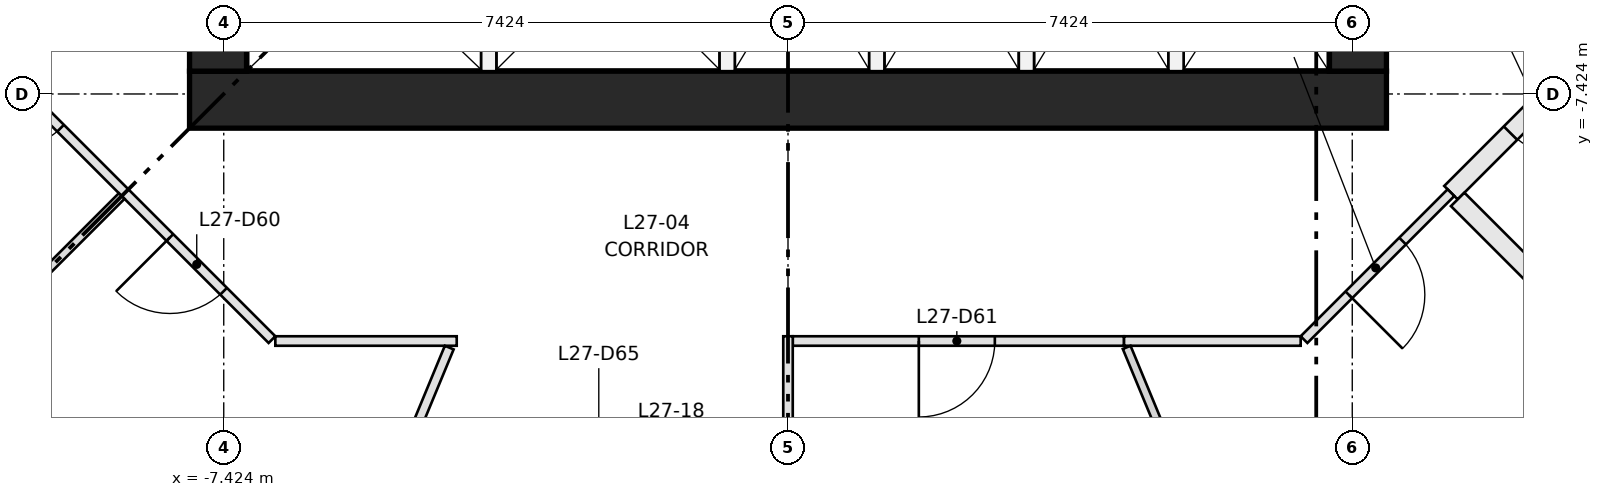
"""IFC4 building model, lengths in metres.
Left out: names, types, materials, properties, quantities, classifications, styles, units other than length and angle.
Written with IfcOpenShell. Run it as: python <this file> out.ifc"""

import sys

from ifc_helpers import new_model, si_unit, direction, frame, frame_2d, origin, place, context, subcontext, project, spatial, rectangle, extrude, element, fill, save


model = new_model("IFC4")
c1 = context("Model", 3, precision=1e-05, world=origin(), true_north=direction((0.0, 1.0)))
c2 = subcontext(c1, "Body", "Model", "MODEL_VIEW")
j1 = project(units=[si_unit("LENGTHUNIT", "METRE"), si_unit("PLANEANGLEUNIT", "RADIAN")], contexts=[c1])
p1 = place(None, origin())
s1 = spatial("IfcSite", under=j1, at=p1, CompositionType="ELEMENT")
p2 = place(p1, origin())
s2 = spatial("IfcBuilding", under=s1, at=p2, CompositionType="ELEMENT")
p3 = place(p2, frame((0.0, 0.0, 105.6)))
s3 = spatial("IfcBuildingStorey", under=s2, at=p3, CompositionType="ELEMENT", Elevation=105.6)
p4 = place(p3, frame((-7.874, -7.499, 0.0), z_axis=(0.0, 0.0, 1.0), x_axis=(1.0, 0.0, 0.0)))
e1 = element("IfcWall", 1, at=p4, inside=s3, PredefinedType="SHEAR", context=c2, shape_type="SweptSolid", body=[
    extrude(rectangle(XDim=15.748, YDim=0.75, at=frame_2d((7.874, 0.0))), origin(), (0.0, 0.0, 1.0), 3.65),
])
p5 = place(p3, frame((-7.499, -7.124, 0.0), z_axis=(0.0, 0.0, 1.0), x_axis=(0.0, 1.0, 0.0)))
e2 = element("IfcWall", 2, at=p5, inside=s3, PredefinedType="SHEAR", context=c2, shape_type="SweptSolid", body=[
    extrude(rectangle(XDim=14.248, YDim=0.75, at=frame_2d((7.124, 0.0))), origin(), (0.0, 0.0, 1.0), 3.65),
])
p6 = place(p5, frame((6.624, 0.0, 0.0)))
e3 = element("IfcOpeningElement", 3, at=p6, cuts=e2, PredefinedType="OPENING", context=c2, shape_type="SweptSolid", body=[
    extrude(rectangle(XDim=1.0, YDim=2.1, at=frame_2d((0.5, 1.05))), frame((0.0, 0.385, 0.0), z_axis=(0.0, -1.0, 0.0), x_axis=(1.0, 0.0, 0.0)), (0.0, 0.0, 1.0), 0.77),
])
p7 = place(p5, frame((3.5, 0.0, 0.0)))
e4 = element("IfcOpeningElement", 4, at=p7, cuts=e2, PredefinedType="OPENING", context=c2, shape_type="SweptSolid", body=[
    extrude(rectangle(XDim=1.8, YDim=2.1, at=frame_2d((0.9, 1.05))), frame((0.0, 0.385, 0.0), z_axis=(0.0, -1.0, 0.0), x_axis=(1.0, 0.0, 0.0)), (0.0, 0.0, 1.0), 0.77),
])
p8 = place(p5, frame((8.948, 0.0, 0.0)))
e5 = element("IfcOpeningElement", 5, at=p8, cuts=e2, PredefinedType="OPENING", context=c2, shape_type="SweptSolid", body=[
    extrude(rectangle(XDim=1.8, YDim=2.1, at=frame_2d((0.9, 1.05))), frame((0.0, 0.385, 0.0), z_axis=(0.0, -1.0, 0.0), x_axis=(1.0, 0.0, 0.0)), (0.0, 0.0, 1.0), 0.77),
])
p9 = place(p5, frame((12.124, 0.0, 0.0)))
e6 = element("IfcOpeningElement", 6, at=p9, cuts=e2, PredefinedType="OPENING", context=c2, shape_type="SweptSolid", body=[
    extrude(rectangle(XDim=1.0, YDim=2.1, at=frame_2d((0.5, 1.05))), frame((0.0, 0.385, 0.0), z_axis=(0.0, -1.0, 0.0), x_axis=(1.0, 0.0, 0.0)), (0.0, 0.0, 1.0), 0.77),
])
p10 = place(p3, frame((7.499, -7.124, 0.0), z_axis=(0.0, 0.0, 1.0), x_axis=(0.0, 1.0, 0.0)))
e7 = element("IfcWall", 7, at=p10, inside=s3, PredefinedType="SHEAR", context=c2, shape_type="SweptSolid", body=[
    extrude(rectangle(XDim=14.248, YDim=0.75, at=frame_2d((7.124, 0.0))), origin(), (0.0, 0.0, 1.0), 3.65),
])
p11 = place(p10, frame((6.624, 0.0, 0.0)))
e8 = element("IfcOpeningElement", 8, at=p11, cuts=e7, PredefinedType="OPENING", context=c2, shape_type="SweptSolid", body=[
    extrude(rectangle(XDim=1.0, YDim=2.1, at=frame_2d((0.5, 1.05))), frame((0.0, 0.385, 0.0), z_axis=(0.0, -1.0, 0.0), x_axis=(1.0, 0.0, 0.0)), (0.0, 0.0, 1.0), 0.77),
])
p12 = place(p10, frame((3.5, 0.0, 0.0)))
e9 = element("IfcOpeningElement", 9, at=p12, cuts=e7, PredefinedType="OPENING", context=c2, shape_type="SweptSolid", body=[
    extrude(rectangle(XDim=1.8, YDim=2.1, at=frame_2d((0.9, 1.05))), frame((0.0, 0.385, 0.0), z_axis=(0.0, -1.0, 0.0), x_axis=(1.0, 0.0, 0.0)), (0.0, 0.0, 1.0), 0.77),
])
p13 = place(p10, frame((8.948, 0.0, 0.0)))
e10 = element("IfcOpeningElement", 10, at=p13, cuts=e7, PredefinedType="OPENING", context=c2, shape_type="SweptSolid", body=[
    extrude(rectangle(XDim=1.8, YDim=2.1, at=frame_2d((0.9, 1.05))), frame((0.0, 0.385, 0.0), z_axis=(0.0, -1.0, 0.0), x_axis=(1.0, 0.0, 0.0)), (0.0, 0.0, 1.0), 0.77),
])
for number, where, z_axis, x_axis in (
    (11, (-3.937, -7.124, 0.0), (0.0, 0.0, 1.0), (0.0, 1.0, 0.0)),
    (12, (-0.8, -7.124, 0.0), (0.0, 0.0, 1.0), (0.0, 1.0, 0.0)),
    (13, (1.168, -7.124, 0.0), (0.0, 0.0, 1.0), (0.0, 1.0, 0.0)),
    (14, (3.137, -7.124, 0.0), (0.0, 0.0, 1.0), (0.0, 1.0, 0.0)),
    (15, (5.105, -7.124, 0.0), (0.0, 0.0, 1.0), (0.0, 1.0, 0.0)),
):
    element("IfcWall", number, at=place(p3, frame(where, z_axis=z_axis, x_axis=x_axis)), inside=s3, PredefinedType="PARTITIONING", context=c2, shape_type="SweptSolid", body=[
        extrude(rectangle(XDim=2.95, YDim=0.2, at=frame_2d((1.475, 0.0))), origin(), (0.0, 0.0, 1.0), 3.3),
    ])
p14 = place(p3, frame((10.637, -6.808, 0.0), z_axis=(0.0, 0.0, 1.0), x_axis=(-0.707151855722, -0.707061703777, 0.0)))
e16 = element("IfcWall", 16, at=p14, inside=s3, PredefinedType="PARTITIONING", context=c2, shape_type="SweptSolid", body=[
    extrude(rectangle(XDim=2.708, YDim=0.25, at=frame_2d((1.354, 0.0))), origin(), (0.0, 0.0, 1.0), 3.3),
])
p15 = place(p14, frame((0.6, 0.0, 0.0)))
e17 = element("IfcOpeningElement", 17, at=p15, cuts=e16, PredefinedType="OPENING", context=c2, shape_type="SweptSolid", body=[
    extrude(rectangle(XDim=1.0, YDim=2.1, at=frame_2d((0.5, 1.05))), frame((0.0, 0.135, 0.0), z_axis=(0.0, -1.0, 0.0), x_axis=(1.0, 0.0, 0.0)), (0.0, 0.0, 1.0), 0.27),
])
p16 = place(p3, frame((-8.722, -8.722, 0.0), z_axis=(0.0, 0.0, 1.0), x_axis=(-0.707151428813, 0.707062130741, 0.0)))
e18 = element("IfcWall", 18, at=p16, inside=s3, PredefinedType="PARTITIONING", context=c2, shape_type="SweptSolid", body=[
    extrude(rectangle(XDim=2.734, YDim=0.125, at=frame_2d((1.367, 0.0))), origin(), (0.0, 0.0, 1.0), 3.3),
])
p17 = place(p16, frame((1.2, 0.0, 0.0)))
e19 = element("IfcOpeningElement", 19, at=p17, cuts=e18, PredefinedType="OPENING", context=c2, shape_type="SweptSolid", body=[
    extrude(rectangle(XDim=1.0, YDim=2.1, at=frame_2d((0.5, 1.05))), frame((0.0, 0.073, 0.0), z_axis=(0.0, -1.0, 0.0), x_axis=(1.0, 0.0, 0.0)), (0.0, 0.0, 1.0), 0.145),
])
p18 = place(p3, frame((-6.789, -10.656, 0.0), z_axis=(0.0, 0.0, 1.0), x_axis=(-0.707062130741, 0.707151428813, 0.0)))
e20 = element("IfcWall", 20, at=p18, inside=s3, PredefinedType="PARTITIONING", context=c2, shape_type="SweptSolid", body=[
    extrude(rectangle(XDim=2.734, YDim=0.125, at=frame_2d((1.367, 0.0))), origin(), (0.0, 0.0, 1.0), 3.3),
])
p19 = place(p18, frame((0.9, 0.0, 0.0)))
e21 = element("IfcOpeningElement", 21, at=p19, cuts=e20, PredefinedType="OPENING", context=c2, shape_type="SweptSolid", body=[
    extrude(rectangle(XDim=1.0, YDim=2.1, at=frame_2d((0.5, 1.05))), frame((0.0, 0.073, 0.0), z_axis=(0.0, -1.0, 0.0), x_axis=(1.0, 0.0, 0.0)), (0.0, 0.0, 1.0), 0.145),
])
p20 = place(p3, frame((-4.359, -10.674, 0.0), z_axis=(0.0, 0.0, 1.0), x_axis=(-1.0, 0.0, 0.0)))
e22 = element("IfcWall", 22, at=p20, inside=s3, PredefinedType="PARTITIONING", context=c2, shape_type="SweptSolid", body=[
    extrude(rectangle(XDim=2.386, YDim=0.125, at=frame_2d((1.193, 0.0))), origin(), (0.0, 0.0, 1.0), 3.3),
])
p21 = place(p3, frame((4.421, -10.674, 0.0), z_axis=(0.0, 0.0, 1.0), x_axis=(-1.0, 0.0, 0.0)))
e23 = element("IfcWall", 23, at=p21, inside=s3, PredefinedType="PARTITIONING", context=c2, shape_type="SweptSolid", body=[
    extrude(rectangle(XDim=4.359, YDim=0.125, at=frame_2d((2.179, 0.0))), origin(), (0.0, 0.0, 1.0), 3.3),
])
p22 = place(p21, frame((1.7, 0.0, 0.0)))
e24 = element("IfcOpeningElement", 24, at=p22, cuts=e23, PredefinedType="OPENING", context=c2, shape_type="SweptSolid", body=[
    extrude(rectangle(XDim=1.0, YDim=2.1, at=frame_2d((0.5, 1.05))), frame((0.0, 0.073, 0.0), z_axis=(0.0, -1.0, 0.0), x_axis=(1.0, 0.0, 0.0)), (0.0, 0.0, 1.0), 0.145),
])
p23 = place(p3, frame((6.745, -10.674, 0.0), z_axis=(0.0, 0.0, 1.0), x_axis=(-1.0, 0.0, 0.0)))
e25 = element("IfcWall", 25, at=p23, inside=s3, PredefinedType="PARTITIONING", context=c2, shape_type="SweptSolid", body=[
    extrude(rectangle(XDim=2.324, YDim=0.125, at=frame_2d((1.162, 0.0))), origin(), (0.0, 0.0, 1.0), 3.3),
])
p24 = place(p3, frame((8.722, -8.722, 0.0), z_axis=(0.0, 0.0, 1.0), x_axis=(-0.707062130741, -0.707151428813, 0.0)))
e26 = element("IfcWall", 26, at=p24, inside=s3, PredefinedType="PARTITIONING", context=c2, shape_type="SweptSolid", body=[
    extrude(rectangle(XDim=2.734, YDim=0.125, at=frame_2d((1.367, 0.0))), origin(), (0.0, 0.0, 1.0), 3.3),
])
p25 = place(p24, frame((0.9, 0.0, 0.0)))
e27 = element("IfcOpeningElement", 27, at=p25, cuts=e26, PredefinedType="OPENING", context=c2, shape_type="SweptSolid", body=[
    extrude(rectangle(XDim=1.0, YDim=2.1, at=frame_2d((0.5, 1.05))), frame((0.0, 0.073, 0.0), z_axis=(0.0, -1.0, 0.0), x_axis=(1.0, 0.0, 0.0)), (0.0, 0.0, 1.0), 0.145),
])
p26 = place(p3, frame((-12.728, -12.728, 0.0), z_axis=(0.0, 0.0, 1.0), x_axis=(0.707106781187, 0.707106781187, 0.0)))
e28 = element("IfcWall", 28, at=p26, inside=s3, PredefinedType="PARTITIONING", context=c2, shape_type="SweptSolid", body=[
    extrude(rectangle(XDim=5.602, YDim=0.105, at=frame_2d((2.801, 0.0))), origin(), (0.0, 0.0, 1.0), 3.3),
])
p27 = place(p3, frame((-4.457, -10.76, 0.0), z_axis=(0.0, 0.0, 1.0), x_axis=(-0.382746785562, -0.923853288213, 0.0)))
e29 = element("IfcWall", 29, at=p27, inside=s3, PredefinedType="PARTITIONING", context=c2, shape_type="SweptSolid", body=[
    extrude(rectangle(XDim=1.383, YDim=0.125, at=frame_2d((0.691, 0.0))), origin(), (0.0, 0.0, 1.0), 3.3),
])
p28 = place(p3, frame((0.0, -10.612, 0.0), z_axis=(0.0, 0.0, 1.0), x_axis=(0.0, -1.0, 0.0)))
e30 = element("IfcWall", 30, at=p28, inside=s3, PredefinedType="PARTITIONING", context=c2, shape_type="SweptSolid", body=[
    extrude(rectangle(XDim=2.418, YDim=0.125, at=frame_2d((1.209, 0.0))), origin(), (0.0, 0.0, 1.0), 3.3),
])
p29 = place(p3, frame((4.456, -10.758, 0.0), z_axis=(0.0, 0.0, 1.0), x_axis=(0.382751066095, -0.923851514803, 0.0)))
e31 = element("IfcWall", 31, at=p29, inside=s3, PredefinedType="PARTITIONING", context=c2, shape_type="SweptSolid", body=[
    extrude(rectangle(XDim=1.386, YDim=0.11, at=frame_2d((0.693, 0.0))), origin(), (0.0, 0.0, 1.0), 3.3),
])
p30 = place(p3, frame((8.811, -8.811, 0.0), z_axis=(0.0, 0.0, 1.0), x_axis=(0.707106781187, -0.707106781187, 0.0)))
e32 = element("IfcWall", 32, at=p30, inside=s3, PredefinedType="PARTITIONING", context=c2, shape_type="SweptSolid", body=[
    extrude(rectangle(XDim=5.54, YDim=0.25, at=frame_2d((2.77, 0.0))), origin(), (0.0, 0.0, 1.0), 3.3),
])
p31 = place(p15, origin())
e33 = element("IfcDoor", 33, at=p31, inside=s3, OperationType="SINGLE_SWING_LEFT", PredefinedType="DOOR", context=c2, shape_type="SweptSolid", body=[
    extrude(rectangle(XDim=1.0, YDim=2.1, at=frame_2d((0.5, 1.05))), frame((0.0, 0.025, 0.0), z_axis=(0.0, -1.0, 0.0), x_axis=(1.0, 0.0, 0.0)), (0.0, 0.0, 1.0), 0.05),
])
fill(e17, e33)
p32 = place(p17, origin())
e34 = element("IfcDoor", 34, at=p32, inside=s3, OperationType="SINGLE_SWING_RIGHT", PredefinedType="DOOR", context=c2, shape_type="SweptSolid", body=[
    extrude(rectangle(XDim=1.0, YDim=2.1, at=frame_2d((0.5, 1.05))), frame((0.0, 0.025, 0.0), z_axis=(0.0, -1.0, 0.0), x_axis=(1.0, 0.0, 0.0)), (0.0, 0.0, 1.0), 0.05),
])
fill(e19, e34)
p33 = place(p19, origin())
e35 = element("IfcDoor", 35, at=p33, inside=s3, OperationType="SINGLE_SWING_RIGHT", PredefinedType="DOOR", context=c2, shape_type="SweptSolid", body=[
    extrude(rectangle(XDim=1.0, YDim=2.1, at=frame_2d((0.5, 1.05))), frame((0.0, 0.025, 0.0), z_axis=(0.0, -1.0, 0.0), x_axis=(1.0, 0.0, 0.0)), (0.0, 0.0, 1.0), 0.05),
])
fill(e21, e35)
p34 = place(p22, origin())
e36 = element("IfcDoor", 36, at=p34, inside=s3, OperationType="SINGLE_SWING_RIGHT", PredefinedType="DOOR", context=c2, shape_type="SweptSolid", body=[
    extrude(rectangle(XDim=1.0, YDim=2.1, at=frame_2d((0.5, 1.05))), frame((0.0, 0.025, 0.0), z_axis=(0.0, -1.0, 0.0), x_axis=(1.0, 0.0, 0.0)), (0.0, 0.0, 1.0), 0.05),
])
fill(e24, e36)
p35 = place(p25, origin())
e37 = element("IfcDoor", 37, at=p35, inside=s3, OperationType="SINGLE_SWING_RIGHT", PredefinedType="DOOR", context=c2, shape_type="SweptSolid", body=[
    extrude(rectangle(XDim=1.0, YDim=2.1, at=frame_2d((0.5, 1.05))), frame((0.0, 0.025, 0.0), z_axis=(0.0, -1.0, 0.0), x_axis=(1.0, 0.0, 0.0)), (0.0, 0.0, 1.0), 0.05),
])
fill(e27, e37)
save(model, sys.argv[1])
